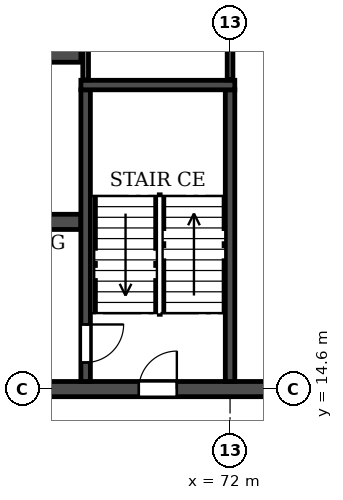
"""IFC4 building model, lengths in metres.
Left out: names, types, materials, properties, quantities, classifications, styles, units other than length and angle.
Written with IfcOpenShell. Run it as: python <this file> out.ifc"""

import sys

from ifc_helpers import new_model, si_unit, direction, frame, frame_2d, origin, place, context, subcontext, project, spatial, rectangle, extrude, element, fill, save


model = new_model("IFC4")
c1 = context("Model", 3, precision=1e-05, world=origin(), true_north=direction((0.0, 1.0)))
c2 = subcontext(c1, "Body", "Model", "MODEL_VIEW")
j1 = project(units=[si_unit("LENGTHUNIT", "METRE"), si_unit("PLANEANGLEUNIT", "RADIAN")], contexts=[c1])
p1 = place(None, origin())
s1 = spatial("IfcSite", under=j1, at=p1, CompositionType="ELEMENT")
p2 = place(p1, origin())
s2 = spatial("IfcBuilding", under=s1, at=p2, CompositionType="ELEMENT")
p3 = place(p2, frame((0.0, 0.0, 181.8)))
s3 = spatial("IfcBuildingStorey", under=s2, at=p3, CompositionType="ELEMENT", Elevation=181.8)
p4 = place(p3, frame((18.2, 14.6, 0.0), z_axis=(0.0, 0.0, 1.0), x_axis=(1.0, 0.0, 0.0)))
e1 = element("IfcWall", 1, at=p4, inside=s3, PredefinedType="SOLIDWALL", context=c2, shape_type="SweptSolid", body=[
    extrude(rectangle(XDim=65.6, YDim=0.4, at=frame_2d((32.8, 0.0))), origin(), (0.0, 0.0, 1.0), 3.08),
])
p5 = place(p4, frame((0.7, 0.0, 0.0)))
e2 = element("IfcOpeningElement", 2, at=p5, cuts=e1, PredefinedType="OPENING", context=c2, shape_type="SweptSolid", body=[
    extrude(rectangle(XDim=1.0, YDim=2.1, at=frame_2d((0.5, 1.05))), frame((0.0, 0.21, 0.0), z_axis=(0.0, -1.0, 0.0), x_axis=(1.0, 0.0, 0.0)), (0.0, 0.0, 1.0), 0.42),
])
p6 = place(p4, frame((8.6, 0.0, 0.0)))
e3 = element("IfcOpeningElement", 3, at=p6, cuts=e1, PredefinedType="OPENING", context=c2, shape_type="SweptSolid", body=[
    extrude(rectangle(XDim=1.0, YDim=2.1, at=frame_2d((0.5, 1.05))), frame((0.0, 0.21, 0.0), z_axis=(0.0, -1.0, 0.0), x_axis=(1.0, 0.0, 0.0)), (0.0, 0.0, 1.0), 0.42),
])
p7 = place(p4, frame((13.2, 0.0, 0.0)))
e4 = element("IfcOpeningElement", 4, at=p7, cuts=e1, PredefinedType="OPENING", context=c2, shape_type="SweptSolid", body=[
    extrude(rectangle(XDim=1.0, YDim=2.1, at=frame_2d((0.5, 1.05))), frame((0.0, 0.21, 0.0), z_axis=(0.0, -1.0, 0.0), x_axis=(1.0, 0.0, 0.0)), (0.0, 0.0, 1.0), 0.42),
])
p8 = place(p4, frame((24.5, 0.0, 0.0)))
e5 = element("IfcOpeningElement", 5, at=p8, cuts=e1, PredefinedType="OPENING", context=c2, shape_type="SweptSolid", body=[
    extrude(rectangle(XDim=1.0, YDim=2.1, at=frame_2d((0.5, 1.05))), frame((0.0, 0.21, 0.0), z_axis=(0.0, -1.0, 0.0), x_axis=(1.0, 0.0, 0.0)), (0.0, 0.0, 1.0), 0.42),
])
p9 = place(p4, frame((28.4, 0.0, 0.0)))
e6 = element("IfcOpeningElement", 6, at=p9, cuts=e1, PredefinedType="OPENING", context=c2, shape_type="SweptSolid", body=[
    extrude(rectangle(XDim=1.0, YDim=2.1, at=frame_2d((0.5, 1.05))), frame((0.0, 0.21, 0.0), z_axis=(0.0, -1.0, 0.0), x_axis=(1.0, 0.0, 0.0)), (0.0, 0.0, 1.0), 0.42),
])
p10 = place(p4, frame((32.3, 0.0, 0.0)))
e7 = element("IfcOpeningElement", 7, at=p10, cuts=e1, PredefinedType="OPENING", context=c2, shape_type="SweptSolid", body=[
    extrude(rectangle(XDim=1.0, YDim=2.1, at=frame_2d((0.5, 1.05))), frame((0.0, 0.21, 0.0), z_axis=(0.0, -1.0, 0.0), x_axis=(1.0, 0.0, 0.0)), (0.0, 0.0, 1.0), 0.42),
])
p11 = place(p4, frame((34.9, 0.0, 0.0)))
e8 = element("IfcOpeningElement", 8, at=p11, cuts=e1, PredefinedType="OPENING", context=c2, shape_type="SweptSolid", body=[
    extrude(rectangle(XDim=1.0, YDim=2.1, at=frame_2d((0.5, 1.05))), frame((0.0, 0.21, 0.0), z_axis=(0.0, -1.0, 0.0), x_axis=(1.0, 0.0, 0.0)), (0.0, 0.0, 1.0), 0.42),
])
p12 = place(p4, frame((38.8, 0.0, 0.0)))
e9 = element("IfcOpeningElement", 9, at=p12, cuts=e1, PredefinedType="OPENING", context=c2, shape_type="SweptSolid", body=[
    extrude(rectangle(XDim=1.0, YDim=2.1, at=frame_2d((0.5, 1.05))), frame((0.0, 0.21, 0.0), z_axis=(0.0, -1.0, 0.0), x_axis=(1.0, 0.0, 0.0)), (0.0, 0.0, 1.0), 0.42),
])
p13 = place(p4, frame((51.4, 0.0, 0.0)))
e10 = element("IfcOpeningElement", 10, at=p13, cuts=e1, PredefinedType="OPENING", context=c2, shape_type="SweptSolid", body=[
    extrude(rectangle(XDim=1.0, YDim=2.1, at=frame_2d((0.5, 1.05))), frame((0.0, 0.21, 0.0), z_axis=(0.0, -1.0, 0.0), x_axis=(1.0, 0.0, 0.0)), (0.0, 0.0, 1.0), 0.42),
])
p14 = place(p4, frame((56.0, 0.0, 0.0)))
e11 = element("IfcOpeningElement", 11, at=p14, cuts=e1, PredefinedType="OPENING", context=c2, shape_type="SweptSolid", body=[
    extrude(rectangle(XDim=1.0, YDim=2.1, at=frame_2d((0.5, 1.05))), frame((0.0, 0.21, 0.0), z_axis=(0.0, -1.0, 0.0), x_axis=(1.0, 0.0, 0.0)), (0.0, 0.0, 1.0), 0.42),
])
p15 = place(p4, frame((63.9, 0.0, 0.0)))
e12 = element("IfcOpeningElement", 12, at=p15, cuts=e1, PredefinedType="OPENING", context=c2, shape_type="SweptSolid", body=[
    extrude(rectangle(XDim=1.0, YDim=2.1, at=frame_2d((0.5, 1.05))), frame((0.0, 0.21, 0.0), z_axis=(0.0, -1.0, 0.0), x_axis=(1.0, 0.0, 0.0)), (0.0, 0.0, 1.0), 0.42),
])
p16 = place(p3, frame((33.925, 19.0, 0.0), z_axis=(0.0, 0.0, 1.0), x_axis=(1.0, 0.0, 0.0)))
e13 = element("IfcWall", 13, at=p16, inside=s3, PredefinedType="SOLIDWALL", context=c2, shape_type="SweptSolid", body=[
    extrude(rectangle(XDim=34.15, YDim=0.4, at=frame_2d((17.075, 0.0))), origin(), (0.0, 0.0, 1.0), 3.08),
])
p17 = place(p16, frame((16.175, 0.0, 0.0)))
e14 = element("IfcOpeningElement", 14, at=p17, cuts=e13, PredefinedType="OPENING", context=c2, shape_type="SweptSolid", body=[
    extrude(rectangle(XDim=1.8, YDim=2.1, at=frame_2d((0.9, 1.05))), frame((0.0, 0.21, 0.0), z_axis=(0.0, -1.0, 0.0), x_axis=(1.0, 0.0, 0.0)), (0.0, 0.0, 1.0), 0.42),
])
p18 = place(p16, frame((1.525, 0.0, 0.0)))
e15 = element("IfcOpeningElement", 15, at=p18, cuts=e13, PredefinedType="OPENING", context=c2, shape_type="SweptSolid", body=[
    extrude(rectangle(XDim=1.8, YDim=2.1, at=frame_2d((0.9, 1.05))), frame((0.0, 0.21, 0.0), z_axis=(0.0, -1.0, 0.0), x_axis=(1.0, 0.0, 0.0)), (0.0, 0.0, 1.0), 0.42),
])
p19 = place(p16, frame((30.825, 0.0, 0.0)))
e16 = element("IfcOpeningElement", 16, at=p19, cuts=e13, PredefinedType="OPENING", context=c2, shape_type="SweptSolid", body=[
    extrude(rectangle(XDim=1.8, YDim=2.1, at=frame_2d((0.9, 1.05))), frame((0.0, 0.21, 0.0), z_axis=(0.0, -1.0, 0.0), x_axis=(1.0, 0.0, 0.0)), (0.0, 0.0, 1.0), 0.42),
])
p20 = place(p3, frame((33.925, 23.4, 0.0), z_axis=(0.0, 0.0, 1.0), x_axis=(1.0, 0.0, 0.0)))
e17 = element("IfcWall", 17, at=p20, inside=s3, PredefinedType="SOLIDWALL", context=c2, shape_type="SweptSolid", body=[
    extrude(rectangle(XDim=34.15, YDim=0.4, at=frame_2d((17.075, 0.0))), origin(), (0.0, 0.0, 1.0), 3.08),
])
p21 = place(p20, frame((16.175, 0.0, 0.0)))
e18 = element("IfcOpeningElement", 18, at=p21, cuts=e17, PredefinedType="OPENING", context=c2, shape_type="SweptSolid", body=[
    extrude(rectangle(XDim=1.8, YDim=2.1, at=frame_2d((0.9, 1.05))), frame((0.0, 0.21, 0.0), z_axis=(0.0, -1.0, 0.0), x_axis=(1.0, 0.0, 0.0)), (0.0, 0.0, 1.0), 0.42),
])
p22 = place(p20, frame((0.625, 0.0, 0.0)))
e19 = element("IfcOpeningElement", 19, at=p22, cuts=e17, PredefinedType="OPENING", context=c2, shape_type="SweptSolid", body=[
    extrude(rectangle(XDim=1.1, YDim=2.1, at=frame_2d((0.55, 1.05))), frame((0.0, 0.21, 0.0), z_axis=(0.0, -1.0, 0.0), x_axis=(1.0, 0.0, 0.0)), (0.0, 0.0, 1.0), 0.42),
])
p23 = place(p20, frame((3.225, 0.0, 0.0)))
e20 = element("IfcOpeningElement", 20, at=p23, cuts=e17, PredefinedType="OPENING", context=c2, shape_type="SweptSolid", body=[
    extrude(rectangle(XDim=1.1, YDim=2.1, at=frame_2d((0.55, 1.05))), frame((0.0, 0.21, 0.0), z_axis=(0.0, -1.0, 0.0), x_axis=(1.0, 0.0, 0.0)), (0.0, 0.0, 1.0), 0.42),
])
p24 = place(p20, frame((5.825, 0.0, 0.0)))
e21 = element("IfcOpeningElement", 21, at=p24, cuts=e17, PredefinedType="OPENING", context=c2, shape_type="SweptSolid", body=[
    extrude(rectangle(XDim=1.1, YDim=2.1, at=frame_2d((0.55, 1.05))), frame((0.0, 0.21, 0.0), z_axis=(0.0, -1.0, 0.0), x_axis=(1.0, 0.0, 0.0)), (0.0, 0.0, 1.0), 0.42),
])
p25 = place(p20, frame((8.425, 0.0, 0.0)))
e22 = element("IfcOpeningElement", 22, at=p25, cuts=e17, PredefinedType="OPENING", context=c2, shape_type="SweptSolid", body=[
    extrude(rectangle(XDim=1.1, YDim=2.1, at=frame_2d((0.55, 1.05))), frame((0.0, 0.21, 0.0), z_axis=(0.0, -1.0, 0.0), x_axis=(1.0, 0.0, 0.0)), (0.0, 0.0, 1.0), 0.42),
])
p26 = place(p20, frame((11.025, 0.0, 0.0)))
e23 = element("IfcOpeningElement", 23, at=p26, cuts=e17, PredefinedType="OPENING", context=c2, shape_type="SweptSolid", body=[
    extrude(rectangle(XDim=1.1, YDim=2.1, at=frame_2d((0.55, 1.05))), frame((0.0, 0.21, 0.0), z_axis=(0.0, -1.0, 0.0), x_axis=(1.0, 0.0, 0.0)), (0.0, 0.0, 1.0), 0.42),
])
p27 = place(p20, frame((13.625, 0.0, 0.0)))
e24 = element("IfcOpeningElement", 24, at=p27, cuts=e17, PredefinedType="OPENING", context=c2, shape_type="SweptSolid", body=[
    extrude(rectangle(XDim=1.1, YDim=2.1, at=frame_2d((0.55, 1.05))), frame((0.0, 0.21, 0.0), z_axis=(0.0, -1.0, 0.0), x_axis=(1.0, 0.0, 0.0)), (0.0, 0.0, 1.0), 0.42),
])
p28 = place(p20, frame((27.225, 0.0, 0.0)))
e25 = element("IfcOpeningElement", 25, at=p28, cuts=e17, PredefinedType="OPENING", context=c2, shape_type="SweptSolid", body=[
    extrude(rectangle(XDim=1.1, YDim=2.1, at=frame_2d((0.55, 1.05))), frame((0.0, 0.21, 0.0), z_axis=(0.0, -1.0, 0.0), x_axis=(1.0, 0.0, 0.0)), (0.0, 0.0, 1.0), 0.42),
])
p29 = place(p3, frame((68.2, 14.8, 0.0), z_axis=(0.0, 0.0, 1.0), x_axis=(0.0, 1.0, 0.0)))
e26 = element("IfcWall", 26, at=p29, inside=s3, PredefinedType="SOLIDWALL", context=c2, shape_type="SweptSolid", body=[
    extrude(rectangle(XDim=7.675, YDim=0.25, at=frame_2d((3.837, 0.0))), origin(), (0.0, 0.0, 1.0), 3.08),
])
p30 = place(p29, frame((0.5, 0.0, 0.0)))
e27 = element("IfcOpeningElement", 27, at=p30, cuts=e26, PredefinedType="OPENING", context=c2, shape_type="SweptSolid", body=[
    extrude(rectangle(XDim=1.0, YDim=2.1, at=frame_2d((0.5, 1.05))), frame((0.0, 0.135, 0.0), z_axis=(0.0, -1.0, 0.0), x_axis=(1.0, 0.0, 0.0)), (0.0, 0.0, 1.0), 0.27),
])
p31 = place(p3, frame((72.0, 14.8, 0.0), z_axis=(0.0, 0.0, 1.0), x_axis=(0.0, 1.0, 0.0)))
e28 = element("IfcWall", 28, at=p31, inside=s3, PredefinedType="SOLIDWALL", context=c2, shape_type="SweptSolid", body=[
    extrude(rectangle(XDim=7.675, YDim=0.25, at=frame_2d((3.837, 0.0))), origin(), (0.0, 0.0, 1.0), 3.08),
])
p32 = place(p3, frame((68.075, 22.6, 0.0), z_axis=(0.0, 0.0, 1.0), x_axis=(1.0, 0.0, 0.0)))
e29 = element("IfcWall", 29, at=p32, inside=s3, PredefinedType="SOLIDWALL", context=c2, shape_type="SweptSolid", body=[
    extrude(rectangle(XDim=4.05, YDim=0.25, at=frame_2d((2.025, 0.0))), origin(), (0.0, 0.0, 1.0), 3.08),
])
for number, where, z_axis, x_axis in (
    (30, (68.2, 22.735, 0.0), (0.0, 0.0, 1.0), (0.0, 1.0, 0.0)),
    (31, (72.0, 22.735, 0.0), (0.0, 0.0, 1.0), (0.0, 1.0, 0.0)),
):
    element("IfcWall", number, at=place(p3, frame(where, z_axis=z_axis, x_axis=x_axis)), inside=s3, PredefinedType="PARTITIONING", context=c2, shape_type="SweptSolid", body=[
        extrude(rectangle(XDim=4.855, YDim=0.15, at=frame_2d((2.427, 0.0))), origin(), (0.0, 0.0, 1.0), 3.08),
    ])
p33 = place(p13, origin())
e32 = element("IfcDoor", 32, at=p33, inside=s3, OperationType="SINGLE_SWING_RIGHT", PredefinedType="DOOR", context=c2, shape_type="SweptSolid", body=[
    extrude(rectangle(XDim=1.0, YDim=2.1, at=frame_2d((0.5, 1.05))), frame((0.0, 0.025, 0.0), z_axis=(0.0, -1.0, 0.0), x_axis=(1.0, 0.0, 0.0)), (0.0, 0.0, 1.0), 0.05),
])
fill(e10, e32)
p34 = place(p30, frame((1.0, 0.0, 0.0), z_axis=(0.0, 0.0, 1.0), x_axis=(-1.0, 0.0, 0.0)))
e33 = element("IfcDoor", 33, at=p34, inside=s3, OperationType="SINGLE_SWING_LEFT", PredefinedType="DOOR", context=c2, shape_type="SweptSolid", body=[
    extrude(rectangle(XDim=1.0, YDim=2.1, at=frame_2d((0.5, 1.05))), frame((0.0, 0.025, 0.0), z_axis=(0.0, -1.0, 0.0), x_axis=(1.0, 0.0, 0.0)), (0.0, 0.0, 1.0), 0.05),
])
fill(e27, e33)
save(model, sys.argv[1])
